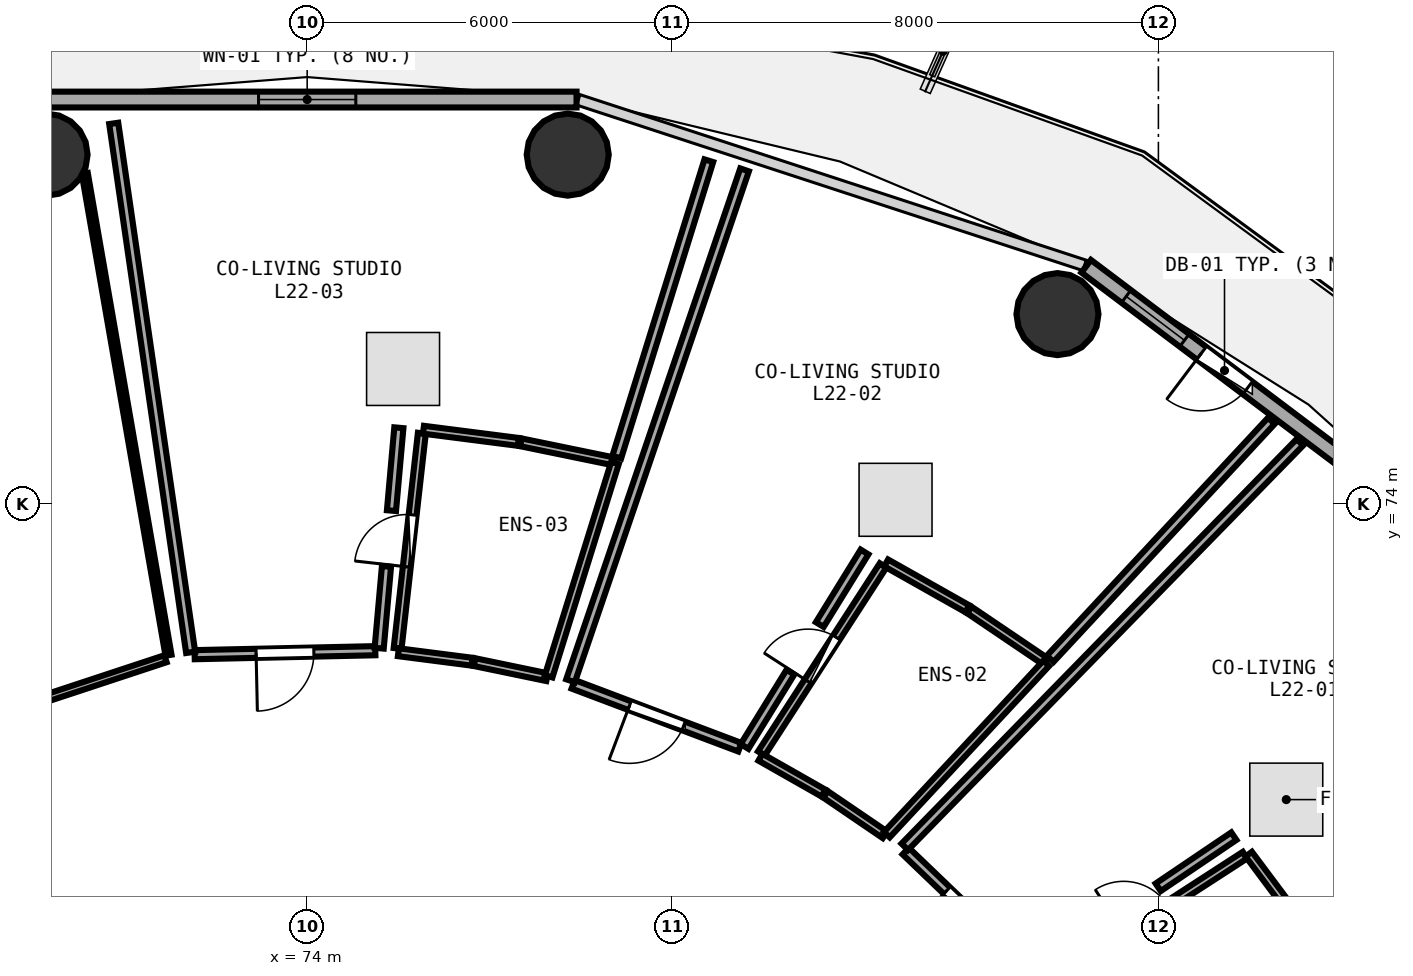
"""IFC4 building model, lengths in metres.
Left out: names, types, materials, properties, quantities, classifications, styles, units other than length and angle.
Written with IfcOpenShell. Run it as: python <this file> out.ifc"""

import sys

from ifc_helpers import new_model, si_unit, direction, frame, frame_2d, origin, origin_2d, place, context, subcontext, project, spatial, rectangle, circle, extrude, element, fill, save


model = new_model("IFC4")
c1 = context("Model", 3, precision=1e-05, world=origin(), true_north=direction((0.0, 1.0)))
c2 = subcontext(c1, "Body", "Model", "MODEL_VIEW")
j1 = project(units=[si_unit("LENGTHUNIT", "METRE"), si_unit("PLANEANGLEUNIT", "RADIAN")], contexts=[c1])
p1 = place(None, origin())
s1 = spatial("IfcSite", under=j1, at=p1, CompositionType="ELEMENT")
p2 = place(p1, origin())
s2 = spatial("IfcBuilding", under=s1, at=p2, CompositionType="ELEMENT")
p3 = place(p2, frame((0.0, 0.0, 87.6)))
s3 = spatial("IfcBuildingStorey", under=s2, at=p3, CompositionType="ELEMENT", Elevation=87.6)
for number, where, z_axis, x_axis in (
    (1, (86.34, 77.122, 0.0), (0.0, 0.0, 1.0), (1.0, 0.0, 0.0)),
    (2, (78.286, 79.745, 0.0), (0.0, 0.0, 1.0), (1.0, 0.0, 0.0)),
    (3, (69.714, 79.745, 0.0), (0.0, 0.0, 1.0), (1.0, 0.0, 0.0)),
):
    element("IfcColumn", number, at=place(p3, frame(where, z_axis=z_axis, x_axis=x_axis)), inside=s3, PredefinedType="COLUMN", context=c2, shape_type="SweptSolid", body=[
        extrude(circle(Radius=0.675, at=origin_2d()), origin(), (0.0, 0.0, 1.0), 3.75),
    ])
p4 = place(p3, frame((93.599, 72.793, 0.0), z_axis=(0.0, 0.0, 1.0), x_axis=(-0.798501507879, 0.601992808857, 0.0)))
e4 = element("IfcWall", 4, at=p4, inside=s3, PredefinedType="SOLIDWALL", context=c2, shape_type="SweptSolid", body=[
    extrude(rectangle(XDim=8.499, YDim=0.26, at=frame_2d((4.25, 0.0))), origin(), (0.0, 0.0, 1.0), 3.475),
])
p5 = place(p4, frame((5.175, 0.0, 0.0)))
e5 = element("IfcOpeningElement", 5, at=p5, cuts=e4, PredefinedType="OPENING", context=c2, shape_type="SweptSolid", body=[
    extrude(rectangle(XDim=0.95, YDim=2.1, at=frame_2d((0.475, 1.05))), frame((0.0, 0.14, 0.0), z_axis=(0.0, -1.0, 0.0), x_axis=(1.0, 0.0, 0.0)), (0.0, 0.0, 1.0), 0.28),
])
p6 = place(p4, frame((6.475, 0.0, 0.85)))
e6 = element("IfcOpeningElement", 6, at=p6, cuts=e4, PredefinedType="OPENING", context=c2, shape_type="SweptSolid", body=[
    extrude(rectangle(XDim=1.2, YDim=1.45, at=frame_2d((0.6, 0.725))), frame((0.0, 0.14, 0.0), z_axis=(0.0, -1.0, 0.0), x_axis=(1.0, 0.0, 0.0)), (0.0, 0.0, 1.0), 0.28),
])
p7 = place(p3, frame((78.43, 80.651, 0.0), z_axis=(0.0, 0.0, 1.0), x_axis=(-1.0, 0.0, 0.0)))
e7 = element("IfcWall", 7, at=p7, inside=s3, PredefinedType="SOLIDWALL", context=c2, shape_type="SweptSolid", body=[
    extrude(rectangle(XDim=8.861, YDim=0.26, at=frame_2d((4.43, 0.0))), origin(), (0.0, 0.0, 1.0), 3.475),
])
p8 = place(p7, frame((3.63, 0.0, 0.85)))
e8 = element("IfcOpeningElement", 8, at=p8, cuts=e7, PredefinedType="OPENING", context=c2, shape_type="SweptSolid", body=[
    extrude(rectangle(XDim=1.6, YDim=1.45, at=frame_2d((0.8, 0.725))), frame((0.0, 0.14, 0.0), z_axis=(0.0, -1.0, 0.0), x_axis=(1.0, 0.0, 0.0)), (0.0, 0.0, 1.0), 0.28),
])
p9 = place(p3, frame((86.156, 66.111, 0.0), z_axis=(0.0, 0.0, 1.0), x_axis=(0.839597088747, 0.543209654339, 0.0)))
e9 = element("IfcWall", 9, at=p9, inside=s3, PredefinedType="PLUMBINGWALL", context=c2, shape_type="SweptSolid", body=[
    extrude(rectangle(XDim=3.891, YDim=0.13, at=frame_2d((1.946, 0.0))), origin(), (0.0, 0.0, 1.0), 3.175),
])
p10 = place(p9, frame((1.516, 0.0, 0.0)))
e10 = element("IfcOpeningElement", 10, at=p10, cuts=e9, PredefinedType="OPENING", context=c2, shape_type="SweptSolid", body=[
    extrude(rectangle(XDim=0.86, YDim=2.05, at=frame_2d((0.43, 1.025))), frame((0.0, 0.075, 0.0), z_axis=(0.0, -1.0, 0.0), x_axis=(1.0, 0.0, 0.0)), (0.0, 0.0, 1.0), 0.15),
])
p11 = place(p3, frame((85.882, 66.337, 0.0), z_axis=(0.0, 0.0, 1.0), x_axis=(-0.721698326825, 0.692207718144, 0.0)))
e11 = element("IfcWall", 11, at=p11, inside=s3, PredefinedType="PARTITIONING", context=c2, shape_type="SweptSolid", body=[
    extrude(rectangle(XDim=2.823, YDim=0.15, at=frame_2d((1.412, 0.0))), origin(), (0.0, 0.0, 1.0), 2.925),
])
p12 = place(p11, frame((0.936, 0.0, 0.0)))
e12 = element("IfcOpeningElement", 12, at=p12, cuts=e11, PredefinedType="OPENING", context=c2, shape_type="SweptSolid", body=[
    extrude(rectangle(XDim=0.95, YDim=2.08, at=frame_2d((0.475, 1.04))), frame((0.0, 0.085, 0.0), z_axis=(0.0, -1.0, 0.0), x_axis=(1.0, 0.0, 0.0)), (0.0, 0.0, 1.0), 0.17),
])
p13 = place(p3, frame((81.469, 69.896, 0.0), z_axis=(0.0, 0.0, 1.0), x_axis=(0.543429789712, 0.839454622748, 0.0)))
e13 = element("IfcWall", 13, at=p13, inside=s3, PredefinedType="PLUMBINGWALL", context=c2, shape_type="SweptSolid", body=[
    extrude(rectangle(XDim=3.686, YDim=0.13, at=frame_2d((1.843, 0.0))), origin(), (0.0, 0.0, 1.0), 3.175),
])
p14 = place(p13, frame((1.413, 0.0, 0.0)))
e14 = element("IfcOpeningElement", 14, at=p14, cuts=e13, PredefinedType="OPENING", context=c2, shape_type="SweptSolid", body=[
    extrude(rectangle(XDim=0.86, YDim=2.05, at=frame_2d((0.43, 1.025))), frame((0.0, 0.075, 0.0), z_axis=(0.0, -1.0, 0.0), x_axis=(1.0, 0.0, 0.0)), (0.0, 0.0, 1.0), 0.15),
])
p15 = place(p3, frame((81.117, 69.999, 0.0), z_axis=(0.0, 0.0, 1.0), x_axis=(-0.935632349103, 0.352976071868, 0.0)))
e15 = element("IfcWall", 15, at=p15, inside=s3, PredefinedType="PARTITIONING", context=c2, shape_type="SweptSolid", body=[
    extrude(rectangle(XDim=2.931, YDim=0.15, at=frame_2d((1.465, 0.0))), origin(), (0.0, 0.0, 1.0), 2.925),
])
p16 = place(p15, frame((0.99, 0.0, 0.0)))
e16 = element("IfcOpeningElement", 16, at=p16, cuts=e15, PredefinedType="OPENING", context=c2, shape_type="SweptSolid", body=[
    extrude(rectangle(XDim=0.95, YDim=2.08, at=frame_2d((0.475, 1.04))), frame((0.0, 0.085, 0.0), z_axis=(0.0, -1.0, 0.0), x_axis=(1.0, 0.0, 0.0)), (0.0, 0.0, 1.0), 0.17),
])
p17 = place(p3, frame((75.488, 71.624, 0.0), z_axis=(0.0, 0.0, 1.0), x_axis=(0.111853147635, 0.993724747284, 0.0)))
e17 = element("IfcWall", 17, at=p17, inside=s3, PredefinedType="PLUMBINGWALL", context=c2, shape_type="SweptSolid", body=[
    extrude(rectangle(XDim=3.562, YDim=0.13, at=frame_2d((1.781, 0.0))), origin(), (0.0, 0.0, 1.0), 3.175),
])
p18 = place(p17, frame((1.351, 0.0, 0.0)))
e18 = element("IfcOpeningElement", 18, at=p18, cuts=e17, PredefinedType="OPENING", context=c2, shape_type="SweptSolid", body=[
    extrude(rectangle(XDim=0.86, YDim=2.05, at=frame_2d((0.43, 1.025))), frame((0.0, 0.075, 0.0), z_axis=(0.0, -1.0, 0.0), x_axis=(1.0, 0.0, 0.0)), (0.0, 0.0, 1.0), 0.15),
])
p19 = place(p3, frame((75.121, 71.587, 0.0), z_axis=(0.0, 0.0, 1.0), x_axis=(-0.999757617916, -0.022016026426, 0.0)))
e19 = element("IfcWall", 19, at=p19, inside=s3, PredefinedType="PARTITIONING", context=c2, shape_type="SweptSolid", body=[
    extrude(rectangle(XDim=2.972, YDim=0.15, at=frame_2d((1.486, 0.0))), origin(), (0.0, 0.0, 1.0), 3.48),
])
p20 = place(p19, frame((1.011, 0.0, 0.0)))
e20 = element("IfcOpeningElement", 20, at=p20, cuts=e19, PredefinedType="OPENING", context=c2, shape_type="SweptSolid", body=[
    extrude(rectangle(XDim=0.95, YDim=2.08, at=frame_2d((0.475, 1.04))), frame((0.0, 0.085, 0.0), z_axis=(0.0, -1.0, 0.0), x_axis=(1.0, 0.0, 0.0)), (0.0, 0.0, 1.0), 0.17),
])
p21 = place(p3, frame((71.67, 71.454, 0.0), z_axis=(0.0, 0.0, 1.0), x_axis=(-0.949607265123, -0.313442246716, 0.0)))
e21 = element("IfcWall", 21, at=p21, inside=s3, PredefinedType="PARTITIONING", context=c2, shape_type="SweptSolid", body=[
    extrude(rectangle(XDim=5.708, YDim=0.12, at=frame_2d((2.854, 0.0))), origin(), (0.0, 0.0, 1.0), 2.925),
])
p22 = place(p21, frame((2.404, 0.0, 0.0)))
e22 = element("IfcOpeningElement", 22, at=p22, cuts=e21, PredefinedType="OPENING", context=c2, shape_type="SweptSolid", body=[
    extrude(rectangle(XDim=0.9, YDim=2.08, at=frame_2d((0.45, 1.04))), frame((0.0, 0.07, 0.0), z_axis=(0.0, -1.0, 0.0), x_axis=(1.0, 0.0, 0.0)), (0.0, 0.0, 1.0), 0.14),
])
p23 = place(p3, frame((89.486, 68.241, 0.0), z_axis=(0.0, 0.0, 1.0), x_axis=(0.598215175904, -0.801335512328, 0.0)))
e23 = element("IfcWall", 23, at=p23, inside=s3, PredefinedType="PLUMBINGWALL", context=c2, shape_type="SweptSolid", body=[
    extrude(rectangle(XDim=1.468, YDim=0.13, at=frame_2d((0.734, 0.0))), origin(), (0.0, 0.0, 1.0), 3.48),
])
p24 = place(p3, frame((83.829, 68.362, 0.0), z_axis=(0.0, 0.0, 1.0), x_axis=(0.698749209364, 0.715366718833, 0.0)))
e24 = element("IfcWall", 24, at=p24, inside=s3, PredefinedType="PARTITIONING", context=c2, shape_type="SweptSolid", body=[
    extrude(rectangle(XDim=9.3, YDim=0.15, at=frame_2d((4.65, 0.0))), origin(), (0.0, 0.0, 1.0), 2.975),
])
p25 = place(p3, frame((89.241, 68.537, 0.0), z_axis=(0.0, 0.0, 1.0), x_axis=(-0.828582854192, -0.559866460631, 0.0)))
e25 = element("IfcWall", 25, at=p25, inside=s3, PredefinedType="PARTITIONING", context=c2, shape_type="SweptSolid", body=[
    extrude(rectangle(XDim=1.502, YDim=0.15, at=frame_2d((0.751, 0.0))), origin(), (0.0, 0.0, 1.0), 3.175),
])
p26 = place(p3, frame((83.503, 68.558, 0.0), z_axis=(0.0, 0.0, 1.0), x_axis=(-0.826715543633, 0.56262012932, 0.0)))
e26 = element("IfcWall", 26, at=p26, inside=s3, PredefinedType="PLUMBINGWALL", context=c2, shape_type="SweptSolid", body=[
    extrude(rectangle(XDim=1.184, YDim=0.13, at=frame_2d((0.592, 0.0))), origin(), (0.0, 0.0, 1.0), 2.925),
])
p27 = place(p3, frame((82.49, 69.246, 0.0), z_axis=(0.0, 0.0, 1.0), x_axis=(-0.869224537935, 0.494417538778, 0.0)))
e27 = element("IfcWall", 27, at=p27, inside=s3, PredefinedType="PLUMBINGWALL", context=c2, shape_type="SweptSolid", body=[
    extrude(rectangle(XDim=1.192, YDim=0.13, at=frame_2d((0.596, 0.0))), origin(), (0.0, 0.0, 1.0), 3.48),
])
p28 = place(p3, frame((83.522, 73.03, 0.0), z_axis=(0.0, 0.0, 1.0), x_axis=(0.870915556508, -0.491432694713, 0.0)))
e28 = element("IfcWall", 28, at=p28, inside=s3, PredefinedType="PLUMBINGWALL", context=c2, shape_type="SweptSolid", body=[
    extrude(rectangle(XDim=1.533, YDim=0.13, at=frame_2d((0.767, 0.0))), origin(), (0.0, 0.0, 1.0), 2.925),
])
p29 = place(p3, frame((84.892, 72.256, 0.0), z_axis=(0.0, 0.0, 1.0), x_axis=(0.828476223524, -0.560024237917, 0.0)))
e29 = element("IfcWall", 29, at=p29, inside=s3, PredefinedType="PLUMBINGWALL", context=c2, shape_type="SweptSolid", body=[
    extrude(rectangle(XDim=1.521, YDim=0.13, at=frame_2d((0.76, 0.0))), origin(), (0.0, 0.0, 1.0), 3.175),
])
p30 = place(p3, frame((86.154, 71.378, 0.0), z_axis=(0.0, 0.0, 1.0), x_axis=(-0.681137169266, -0.732155828116, 0.0)))
e30 = element("IfcWall", 30, at=p30, inside=s3, PredefinedType="PLUMBINGWALL", context=c2, shape_type="SweptSolid", body=[
    extrude(rectangle(XDim=3.847, YDim=0.13, at=frame_2d((1.924, 0.0))), origin(), (0.0, 0.0, 1.0), 3.175),
])
p31 = place(p3, frame((78.332, 71.093, 0.0), z_axis=(0.0, 0.0, 1.0), x_axis=(0.322500856516, 0.946569172088, 0.0)))
e31 = element("IfcWall", 31, at=p31, inside=s3, PredefinedType="PARTITIONING", context=c2, shape_type="SweptSolid", body=[
    extrude(rectangle(XDim=8.875, YDim=0.15, at=frame_2d((4.438, 0.0))), origin(), (0.0, 0.0, 1.0), 2.925),
])
p32 = place(p3, frame((89.858, 75.367, 0.0), z_axis=(0.0, 0.0, 1.0), x_axis=(-0.680841843483, -0.732430463704, 0.0)))
e32 = element("IfcWall", 32, at=p32, inside=s3, PredefinedType="PARTITIONING", context=c2, shape_type="SweptSolid", body=[
    extrude(rectangle(XDim=5.343, YDim=0.15, at=frame_2d((2.671, 0.0))), origin(), (0.0, 0.0, 1.0), 2.975),
])
p33 = place(p3, frame((83.167, 73.21, 0.0), z_axis=(0.0, 0.0, 1.0), x_axis=(-0.525107327047, -0.8510360128, 0.0)))
e33 = element("IfcWall", 33, at=p33, inside=s3, PredefinedType="PARTITIONING", context=c2, shape_type="SweptSolid", body=[
    extrude(rectangle(XDim=1.402, YDim=0.15, at=frame_2d((0.701, 0.0))), origin(), (0.0, 0.0, 1.0), 3.175),
])
p34 = place(p3, frame((81.948, 71.233, 0.0), z_axis=(0.0, 0.0, 1.0), x_axis=(-0.52498935376, -0.851108793539, 0.0)))
e34 = element("IfcWall", 34, at=p34, inside=s3, PredefinedType="PARTITIONING", context=c2, shape_type="SweptSolid", body=[
    extrude(rectangle(XDim=1.435, YDim=0.15, at=frame_2d((0.718, 0.0))), origin(), (0.0, 0.0, 1.0), 3.235),
])
p35 = place(p3, frame((77.946, 71.151, 0.0), z_axis=(0.0, 0.0, 1.0), x_axis=(-0.979121805859, 0.203274418684, 0.0)))
e35 = element("IfcWall", 35, at=p35, inside=s3, PredefinedType="PLUMBINGWALL", context=c2, shape_type="SweptSolid", body=[
    extrude(rectangle(XDim=1.219, YDim=0.13, at=frame_2d((0.609, 0.0))), origin(), (0.0, 0.0, 1.0), 3.48),
])
p36 = place(p3, frame((76.713, 71.406, 0.0), z_axis=(0.0, 0.0, 1.0), x_axis=(-0.991848040681, 0.127426308891, 0.0)))
e36 = element("IfcWall", 36, at=p36, inside=s3, PredefinedType="PLUMBINGWALL", context=c2, shape_type="SweptSolid", body=[
    extrude(rectangle(XDim=1.222, YDim=0.13, at=frame_2d((0.611, 0.0))), origin(), (0.0, 0.0, 1.0), 3.48),
])
p37 = place(p3, frame((75.913, 75.22, 0.0), z_axis=(0.0, 0.0, 1.0), x_axis=(0.991898711333, -0.127031281405, 0.0)))
e37 = element("IfcWall", 37, at=p37, inside=s3, PredefinedType="PLUMBINGWALL", context=c2, shape_type="SweptSolid", body=[
    extrude(rectangle(XDim=1.574, YDim=0.13, at=frame_2d((0.787, 0.0))), origin(), (0.0, 0.0, 1.0), 3.48),
])
p38 = place(p3, frame((77.514, 75.014, 0.0), z_axis=(0.0, 0.0, 1.0), x_axis=(0.979487788462, -0.201503529137, 0.0)))
e38 = element("IfcWall", 38, at=p38, inside=s3, PredefinedType="PLUMBINGWALL", context=c2, shape_type="SweptSolid", body=[
    extrude(rectangle(XDim=1.568, YDim=0.13, at=frame_2d((0.784, 0.0))), origin(), (0.0, 0.0, 1.0), 3.48),
])
p39 = place(p3, frame((79.063, 74.675, 0.0), z_axis=(0.0, 0.0, 1.0), x_axis=(-0.296927892497, -0.954899903999, 0.0)))
e39 = element("IfcWall", 39, at=p39, inside=s3, PredefinedType="PLUMBINGWALL", context=c2, shape_type="SweptSolid", body=[
    extrude(rectangle(XDim=3.675, YDim=0.13, at=frame_2d((1.837, 0.0))), origin(), (0.0, 0.0, 1.0), 3.175),
])
p40 = place(p3, frame((72.084, 71.56, 0.0), z_axis=(0.0, 0.0, 1.0), x_axis=(-0.143952208647, 0.989584640961, 0.0)))
e40 = element("IfcWall", 40, at=p40, inside=s3, PredefinedType="PARTITIONING", context=c2, shape_type="SweptSolid", body=[
    extrude(rectangle(XDim=8.79, YDim=0.15, at=frame_2d((4.395, 0.0))), origin(), (0.0, 0.0, 1.0), 2.975),
])
p41 = place(p3, frame((80.606, 79.645, 0.0), z_axis=(0.0, 0.0, 1.0), x_axis=(-0.2966895532, -0.954973983427, 0.0)))
e41 = element("IfcWall", 41, at=p41, inside=s3, PredefinedType="PARTITIONING", context=c2, shape_type="SweptSolid", body=[
    extrude(rectangle(XDim=5.104, YDim=0.15, at=frame_2d((2.552, 0.0))), origin(), (0.0, 0.0, 1.0), 2.925),
])
p42 = place(p3, frame((75.508, 75.253, 0.0), z_axis=(0.0, 0.0, 1.0), x_axis=(-0.088846600374, -0.996045321058, 0.0)))
e42 = element("IfcWall", 42, at=p42, inside=s3, PredefinedType="PARTITIONING", context=c2, shape_type="SweptSolid", body=[
    extrude(rectangle(XDim=1.368, YDim=0.15, at=frame_2d((0.684, 0.0))), origin(), (0.0, 0.0, 1.0), 3.175),
])
p43 = place(p3, frame((75.305, 72.973, 0.0), z_axis=(0.0, 0.0, 1.0), x_axis=(-0.088906327267, -0.996039991653, 0.0)))
e43 = element("IfcWall", 43, at=p43, inside=s3, PredefinedType="PARTITIONING", context=c2, shape_type="SweptSolid", body=[
    extrude(rectangle(XDim=1.351, YDim=0.15, at=frame_2d((0.676, 0.0))), origin(), (0.0, 0.0, 1.0), 3.48),
])
p44 = place(p3, frame((70.343, 79.436, 0.0), z_axis=(0.0, 0.0, 1.0), x_axis=(0.171306583965, -0.985217769983, 0.0)))
e44 = element("IfcWall", 44, at=p44, inside=s3, PredefinedType="PARTITIONING", context=c2, shape_type="SweptSolid", body=[
    extrude(rectangle(XDim=8.042, YDim=0.1, at=frame_2d((4.021, 0.0))), origin(), (0.0, 0.0, 1.0), 3.175),
])
p45 = place(p3, frame((87.625, 63.84, 0.0), z_axis=(0.0, 0.0, 1.0), x_axis=(0.92321744991, 0.384277946521, 0.0)))
e45 = element("IfcWall", 45, at=p45, inside=s3, PredefinedType="PARTITIONING", context=c2, shape_type="SweptSolid", body=[
    extrude(rectangle(XDim=9.762, YDim=0.15, at=frame_2d((4.881, 0.0))), origin(), (0.0, 0.0, 1.0), 2.925),
])
p46 = place(p5, frame((0.95, 0.0, 0.0), z_axis=(0.0, 0.0, 1.0), x_axis=(-1.0, 0.0, 0.0)))
e46 = element("IfcDoor", 46, at=p46, inside=s3, OperationType="SINGLE_SWING_LEFT", PredefinedType="DOOR", context=c2, shape_type="SweptSolid", body=[
    extrude(rectangle(XDim=0.95, YDim=2.1, at=frame_2d((0.475, 1.05))), frame((0.0, 0.025, 0.0), z_axis=(0.0, -1.0, 0.0), x_axis=(1.0, 0.0, 0.0)), (0.0, 0.0, 1.0), 0.05),
])
fill(e5, e46)
p47 = place(p6, origin())
e47 = element("IfcWindow", 47, at=p47, inside=s3, PartitioningType="SINGLE_PANEL", PredefinedType="WINDOW", context=c2, shape_type="SweptSolid", body=[
    extrude(rectangle(XDim=1.2, YDim=1.45, at=frame_2d((0.6, 0.725))), frame((0.0, 0.03, 0.0), z_axis=(0.0, -1.0, 0.0), x_axis=(1.0, 0.0, 0.0)), (0.0, 0.0, 1.0), 0.06),
])
fill(e6, e47)
p48 = place(p8, origin())
e48 = element("IfcWindow", 48, at=p48, inside=s3, PartitioningType="SINGLE_PANEL", PredefinedType="WINDOW", context=c2, shape_type="SweptSolid", body=[
    extrude(rectangle(XDim=1.6, YDim=1.45, at=frame_2d((0.8, 0.725))), frame((0.0, 0.03, 0.0), z_axis=(0.0, -1.0, 0.0), x_axis=(1.0, 0.0, 0.0)), (0.0, 0.0, 1.0), 0.06),
])
fill(e8, e48)
p49 = place(p12, origin())
e49 = element("IfcDoor", 49, at=p49, inside=s3, OperationType="SINGLE_SWING_RIGHT", PredefinedType="DOOR", context=c2, shape_type="SweptSolid", body=[
    extrude(rectangle(XDim=0.95, YDim=2.08, at=frame_2d((0.475, 1.04))), frame((0.0, 0.025, 0.0), z_axis=(0.0, -1.0, 0.0), x_axis=(1.0, 0.0, 0.0)), (0.0, 0.0, 1.0), 0.05),
])
fill(e12, e49)
p50 = place(p14, origin())
e50 = element("IfcDoor", 50, at=p50, inside=s3, OperationType="SINGLE_SWING_LEFT", PredefinedType="DOOR", context=c2, shape_type="SweptSolid", body=[
    extrude(rectangle(XDim=0.86, YDim=2.05, at=frame_2d((0.43, 1.025))), frame((0.0, 0.025, 0.0), z_axis=(0.0, -1.0, 0.0), x_axis=(1.0, 0.0, 0.0)), (0.0, 0.0, 1.0), 0.05),
])
fill(e14, e50)
p51 = place(p16, origin())
e51 = element("IfcDoor", 51, at=p51, inside=s3, OperationType="SINGLE_SWING_RIGHT", PredefinedType="DOOR", context=c2, shape_type="SweptSolid", body=[
    extrude(rectangle(XDim=0.95, YDim=2.08, at=frame_2d((0.475, 1.04))), frame((0.0, 0.025, 0.0), z_axis=(0.0, -1.0, 0.0), x_axis=(1.0, 0.0, 0.0)), (0.0, 0.0, 1.0), 0.05),
])
fill(e16, e51)
p52 = place(p18, origin())
e52 = element("IfcDoor", 52, at=p52, inside=s3, OperationType="SINGLE_SWING_LEFT", PredefinedType="DOOR", context=c2, shape_type="SweptSolid", body=[
    extrude(rectangle(XDim=0.86, YDim=2.05, at=frame_2d((0.43, 1.025))), frame((0.0, 0.025, 0.0), z_axis=(0.0, -1.0, 0.0), x_axis=(1.0, 0.0, 0.0)), (0.0, 0.0, 1.0), 0.05),
])
fill(e18, e52)
p53 = place(p20, origin())
e53 = element("IfcDoor", 53, at=p53, inside=s3, OperationType="SINGLE_SWING_RIGHT", PredefinedType="DOOR", context=c2, shape_type="SweptSolid", body=[
    extrude(rectangle(XDim=0.95, YDim=2.08, at=frame_2d((0.475, 1.04))), frame((0.0, 0.025, 0.0), z_axis=(0.0, -1.0, 0.0), x_axis=(1.0, 0.0, 0.0)), (0.0, 0.0, 1.0), 0.05),
])
fill(e20, e53)
save(model, sys.argv[1])
